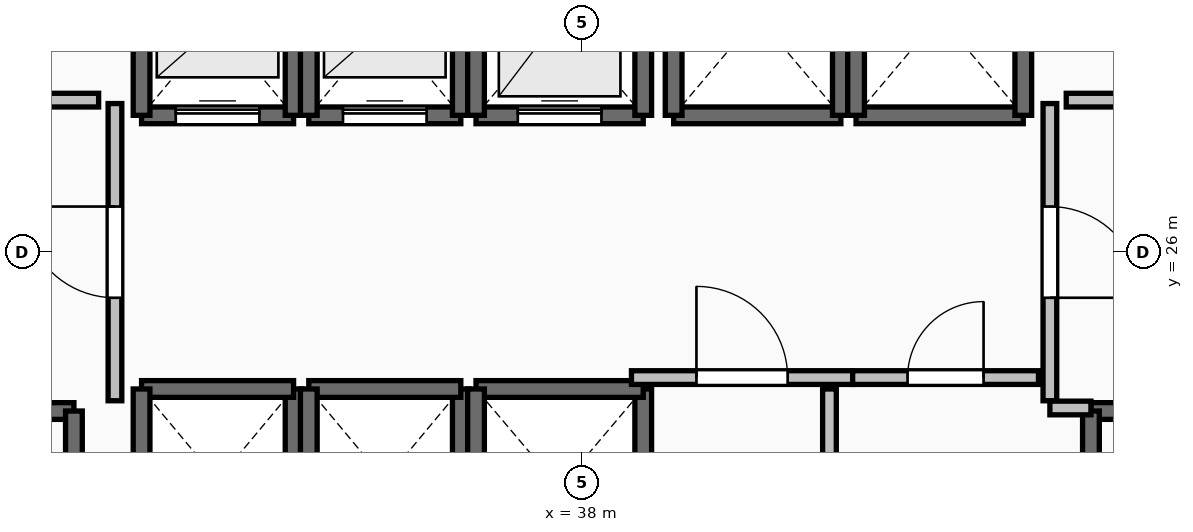
"""IFC4 building model, lengths in metres.
Left out: names, types, materials, properties, quantities, classifications, styles, units other than length and angle.
Written with IfcOpenShell. Run it as: python <this file> out.ifc"""

import sys

from ifc_helpers import new_model, si_unit, direction, frame, frame_2d, origin, place, context, subcontext, project, spatial, rectangle, extrude, element, fill, save


model = new_model("IFC4")
c1 = context("Model", 3, precision=1e-05, world=origin(), true_north=direction((0.0, 1.0)))
c2 = subcontext(c1, "Body", "Model", "MODEL_VIEW")
j1 = project(units=[si_unit("LENGTHUNIT", "METRE"), si_unit("PLANEANGLEUNIT", "RADIAN")], contexts=[c1])
p1 = place(None, origin())
s1 = spatial("IfcSite", under=j1, at=p1, CompositionType="ELEMENT")
p2 = place(p1, origin())
s2 = spatial("IfcBuilding", under=s1, at=p2, CompositionType="ELEMENT")
p3 = place(p2, frame((0.0, 0.0, 103.3)))
s3 = spatial("IfcBuildingStorey", under=s2, at=p3, CompositionType="ELEMENT", Elevation=103.3)
p4 = place(p3, frame((27.94, 23.91, 0.0), z_axis=(0.0, 0.0, 1.0), x_axis=(1.0, 0.0, 0.0)))
e1 = element("IfcWall", 1, at=p4, inside=s3, PredefinedType="SOLIDWALL", context=c2, shape_type="SweptSolid", body=[
    extrude(rectangle(XDim=3.37, YDim=0.22, at=frame_2d((1.685, 0.0))), origin(), (0.0, 0.0, 1.0), 3.24),
])
p5 = place(p4, frame((1.135, 0.0, 0.0)))
e2 = element("IfcOpeningElement", 2, at=p5, cuts=e1, PredefinedType="OPENING", context=c2, shape_type="SweptSolid", body=[
    extrude(rectangle(XDim=1.1, YDim=2.15, at=frame_2d((0.55, 1.075))), frame((0.0, 0.125, 0.0), z_axis=(0.0, -1.0, 0.0), x_axis=(1.0, 0.0, 0.0)), (0.0, 0.0, 1.0), 0.25),
])
p6 = place(p3, frame((31.31, 23.91, 0.0), z_axis=(0.0, 0.0, 1.0), x_axis=(0.0, -1.0, 0.0)))
e3 = element("IfcWall", 3, at=p6, inside=s3, PredefinedType="SOLIDWALL", context=c2, shape_type="SweptSolid", body=[
    extrude(rectangle(XDim=7.42, YDim=0.22, at=frame_2d((3.71, 0.0))), origin(), (0.0, 0.0, 1.0), 3.24),
])
p7 = place(p3, frame((44.69, 23.91, 0.0), z_axis=(0.0, 0.0, 1.0), x_axis=(1.0, 0.0, 0.0)))
e4 = element("IfcWall", 4, at=p7, inside=s3, PredefinedType="SOLIDWALL", context=c2, shape_type="SweptSolid", body=[
    extrude(rectangle(XDim=3.37, YDim=0.22, at=frame_2d((1.685, 0.0))), origin(), (0.0, 0.0, 1.0), 3.24),
])
p8 = place(p7, frame((1.135, 0.0, 0.0)))
e5 = element("IfcOpeningElement", 5, at=p8, cuts=e4, PredefinedType="OPENING", context=c2, shape_type="SweptSolid", body=[
    extrude(rectangle(XDim=1.1, YDim=2.15, at=frame_2d((0.55, 1.075))), frame((0.0, 0.125, 0.0), z_axis=(0.0, -1.0, 0.0), x_axis=(1.0, 0.0, 0.0)), (0.0, 0.0, 1.0), 0.25),
])
p9 = place(p3, frame((44.69, 16.49, 0.0), z_axis=(0.0, 0.0, 1.0), x_axis=(0.0, 1.0, 0.0)))
e6 = element("IfcWall", 6, at=p9, inside=s3, PredefinedType="SOLIDWALL", context=c2, shape_type="SweptSolid", body=[
    extrude(rectangle(XDim=7.42, YDim=0.22, at=frame_2d((3.71, 0.0))), origin(), (0.0, 0.0, 1.0), 3.24),
])
p10 = place(p3, frame((32.2, 27.8, 0.0), z_axis=(0.0, 0.0, 1.0), x_axis=(1.0, 0.0, 0.0)))
e7 = element("IfcWall", 7, at=p10, inside=s3, PredefinedType="SOLIDWALL", context=c2, shape_type="SweptSolid", body=[
    extrude(rectangle(XDim=2.0, YDim=0.22, at=frame_2d((1.0, 0.0))), origin(), (0.0, 0.0, 1.0), 3.24),
])
p11 = place(p10, frame((0.45, 0.0, 0.0)))
e8 = element("IfcOpeningElement", 8, at=p11, cuts=e7, PredefinedType="OPENING", context=c2, shape_type="SweptSolid", body=[
    extrude(rectangle(XDim=1.1, YDim=2.2, at=frame_2d((0.55, 1.1))), frame((0.0, 0.125, 0.0), z_axis=(0.0, -1.0, 0.0), x_axis=(1.0, 0.0, 0.0)), (0.0, 0.0, 1.0), 0.25),
])
for number, where, z_axis, x_axis in (
    (9, (34.2, 27.8, 0.0), (0.0, 0.0, 1.0), (0.0, 1.0, 0.0)),
    (10, (32.2, 30.2, 0.0), (0.0, 0.0, 1.0), (0.0, -1.0, 0.0)),
):
    element("IfcWall", number, at=place(p3, frame(where, z_axis=z_axis, x_axis=x_axis)), inside=s3, PredefinedType="SOLIDWALL", context=c2, shape_type="SweptSolid", body=[
        extrude(rectangle(XDim=2.4, YDim=0.22, at=frame_2d((1.2, 0.0))), origin(), (0.0, 0.0, 1.0), 3.24),
    ])
p12 = place(p3, frame((34.4, 27.8, 0.0), z_axis=(0.0, 0.0, 1.0), x_axis=(1.0, 0.0, 0.0)))
e11 = element("IfcWall", 11, at=p12, inside=s3, PredefinedType="SOLIDWALL", context=c2, shape_type="SweptSolid", body=[
    extrude(rectangle(XDim=2.0, YDim=0.22, at=frame_2d((1.0, 0.0))), origin(), (0.0, 0.0, 1.0), 3.24),
])
p13 = place(p12, frame((0.45, 0.0, 0.0)))
e12 = element("IfcOpeningElement", 12, at=p13, cuts=e11, PredefinedType="OPENING", context=c2, shape_type="SweptSolid", body=[
    extrude(rectangle(XDim=1.1, YDim=2.2, at=frame_2d((0.55, 1.1))), frame((0.0, 0.125, 0.0), z_axis=(0.0, -1.0, 0.0), x_axis=(1.0, 0.0, 0.0)), (0.0, 0.0, 1.0), 0.25),
])
for number, where, z_axis, x_axis in (
    (13, (36.4, 27.8, 0.0), (0.0, 0.0, 1.0), (0.0, 1.0, 0.0)),
    (14, (34.4, 30.2, 0.0), (0.0, 0.0, 1.0), (0.0, -1.0, 0.0)),
):
    element("IfcWall", number, at=place(p3, frame(where, z_axis=z_axis, x_axis=x_axis)), inside=s3, PredefinedType="SOLIDWALL", context=c2, shape_type="SweptSolid", body=[
        extrude(rectangle(XDim=2.4, YDim=0.22, at=frame_2d((1.2, 0.0))), origin(), (0.0, 0.0, 1.0), 3.24),
    ])
p14 = place(p3, frame((36.6, 27.8, 0.0), z_axis=(0.0, 0.0, 1.0), x_axis=(1.0, 0.0, 0.0)))
e15 = element("IfcWall", 15, at=p14, inside=s3, PredefinedType="SOLIDWALL", context=c2, shape_type="SweptSolid", body=[
    extrude(rectangle(XDim=2.2, YDim=0.22, at=frame_2d((1.1, 0.0))), origin(), (0.0, 0.0, 1.0), 3.24),
])
p15 = place(p14, frame((0.55, 0.0, 0.0)))
e16 = element("IfcOpeningElement", 16, at=p15, cuts=e15, PredefinedType="OPENING", context=c2, shape_type="SweptSolid", body=[
    extrude(rectangle(XDim=1.1, YDim=2.2, at=frame_2d((0.55, 1.1))), frame((0.0, 0.125, 0.0), z_axis=(0.0, -1.0, 0.0), x_axis=(1.0, 0.0, 0.0)), (0.0, 0.0, 1.0), 0.25),
])
for number, where, z_axis, x_axis in (
    (17, (38.8, 27.8, 0.0), (0.0, 0.0, 1.0), (0.0, 1.0, 0.0)),
    (18, (36.6, 30.4, 0.0), (0.0, 0.0, 1.0), (0.0, -1.0, 0.0)),
):
    element("IfcWall", number, at=place(p3, frame(where, z_axis=z_axis, x_axis=x_axis)), inside=s3, PredefinedType="SOLIDWALL", context=c2, shape_type="SweptSolid", body=[
        extrude(rectangle(XDim=2.6, YDim=0.22, at=frame_2d((1.3, 0.0))), origin(), (0.0, 0.0, 1.0), 3.24),
    ])
p16 = place(p3, frame((34.2, 21.8, 0.0), z_axis=(0.0, 0.0, 1.0), x_axis=(0.0, 1.0, 0.0)))
e19 = element("IfcWall", 19, at=p16, inside=s3, PredefinedType="SOLIDWALL", context=c2, shape_type="SweptSolid", body=[
    extrude(rectangle(XDim=2.4, YDim=0.22, at=frame_2d((1.2, 0.0))), origin(), (0.0, 0.0, 1.0), 3.24),
])
p17 = place(p3, frame((34.2, 24.2, 0.0), z_axis=(0.0, 0.0, 1.0), x_axis=(-1.0, 0.0, 0.0)))
e20 = element("IfcWall", 20, at=p17, inside=s3, PredefinedType="SOLIDWALL", context=c2, shape_type="SweptSolid", body=[
    extrude(rectangle(XDim=2.0, YDim=0.22, at=frame_2d((1.0, 0.0))), origin(), (0.0, 0.0, 1.0), 3.24),
])
for number, where, z_axis, x_axis in (
    (21, (32.2, 24.2, 0.0), (0.0, 0.0, 1.0), (0.0, -1.0, 0.0)),
    (22, (36.4, 21.8, 0.0), (0.0, 0.0, 1.0), (0.0, 1.0, 0.0)),
):
    element("IfcWall", number, at=place(p3, frame(where, z_axis=z_axis, x_axis=x_axis)), inside=s3, PredefinedType="SOLIDWALL", context=c2, shape_type="SweptSolid", body=[
        extrude(rectangle(XDim=2.4, YDim=0.22, at=frame_2d((1.2, 0.0))), origin(), (0.0, 0.0, 1.0), 3.24),
    ])
p18 = place(p3, frame((36.4, 24.2, 0.0), z_axis=(0.0, 0.0, 1.0), x_axis=(-1.0, 0.0, 0.0)))
e23 = element("IfcWall", 23, at=p18, inside=s3, PredefinedType="SOLIDWALL", context=c2, shape_type="SweptSolid", body=[
    extrude(rectangle(XDim=2.0, YDim=0.22, at=frame_2d((1.0, 0.0))), origin(), (0.0, 0.0, 1.0), 3.24),
])
p19 = place(p3, frame((34.4, 24.2, 0.0), z_axis=(0.0, 0.0, 1.0), x_axis=(0.0, -1.0, 0.0)))
e24 = element("IfcWall", 24, at=p19, inside=s3, PredefinedType="SOLIDWALL", context=c2, shape_type="SweptSolid", body=[
    extrude(rectangle(XDim=2.4, YDim=0.22, at=frame_2d((1.2, 0.0))), origin(), (0.0, 0.0, 1.0), 3.24),
])
p20 = place(p3, frame((38.8, 21.6, 0.0), z_axis=(0.0, 0.0, 1.0), x_axis=(0.0, 1.0, 0.0)))
e25 = element("IfcWall", 25, at=p20, inside=s3, PredefinedType="SOLIDWALL", context=c2, shape_type="SweptSolid", body=[
    extrude(rectangle(XDim=2.6, YDim=0.22, at=frame_2d((1.3, 0.0))), origin(), (0.0, 0.0, 1.0), 3.24),
])
p21 = place(p3, frame((38.8, 24.2, 0.0), z_axis=(0.0, 0.0, 1.0), x_axis=(-1.0, 0.0, 0.0)))
e26 = element("IfcWall", 26, at=p21, inside=s3, PredefinedType="SOLIDWALL", context=c2, shape_type="SweptSolid", body=[
    extrude(rectangle(XDim=2.2, YDim=0.22, at=frame_2d((1.1, 0.0))), origin(), (0.0, 0.0, 1.0), 3.24),
])
p22 = place(p3, frame((36.6, 24.2, 0.0), z_axis=(0.0, 0.0, 1.0), x_axis=(0.0, -1.0, 0.0)))
e27 = element("IfcWall", 27, at=p22, inside=s3, PredefinedType="SOLIDWALL", context=c2, shape_type="SweptSolid", body=[
    extrude(rectangle(XDim=2.6, YDim=0.22, at=frame_2d((1.3, 0.0))), origin(), (0.0, 0.0, 1.0), 3.24),
])
p23 = place(p3, frame((39.2, 27.8, 0.0), z_axis=(0.0, 0.0, 1.0), x_axis=(1.0, 0.0, 0.0)))
e28 = element("IfcWall", 28, at=p23, inside=s3, PredefinedType="SOLIDWALL", context=c2, shape_type="SweptSolid", body=[
    extrude(rectangle(XDim=2.2, YDim=0.22, at=frame_2d((1.1, 0.0))), origin(), (0.0, 0.0, 1.0), 3.24),
])
for number, where, z_axis, x_axis in (
    (29, (41.4, 27.8, 0.0), (0.0, 0.0, 1.0), (0.0, 1.0, 0.0)),
    (30, (39.2, 30.4, 0.0), (0.0, 0.0, 1.0), (0.0, -1.0, 0.0)),
):
    element("IfcWall", number, at=place(p3, frame(where, z_axis=z_axis, x_axis=x_axis)), inside=s3, PredefinedType="SOLIDWALL", context=c2, shape_type="SweptSolid", body=[
        extrude(rectangle(XDim=2.6, YDim=0.22, at=frame_2d((1.3, 0.0))), origin(), (0.0, 0.0, 1.0), 3.24),
    ])
p24 = place(p3, frame((41.6, 27.8, 0.0), z_axis=(0.0, 0.0, 1.0), x_axis=(1.0, 0.0, 0.0)))
e31 = element("IfcWall", 31, at=p24, inside=s3, PredefinedType="SOLIDWALL", context=c2, shape_type="SweptSolid", body=[
    extrude(rectangle(XDim=2.2, YDim=0.22, at=frame_2d((1.1, 0.0))), origin(), (0.0, 0.0, 1.0), 3.24),
])
for number, where, z_axis, x_axis in (
    (32, (43.8, 27.8, 0.0), (0.0, 0.0, 1.0), (0.0, 1.0, 0.0)),
    (33, (41.6, 30.4, 0.0), (0.0, 0.0, 1.0), (0.0, -1.0, 0.0)),
):
    element("IfcWall", number, at=place(p3, frame(where, z_axis=z_axis, x_axis=x_axis)), inside=s3, PredefinedType="SOLIDWALL", context=c2, shape_type="SweptSolid", body=[
        extrude(rectangle(XDim=2.6, YDim=0.22, at=frame_2d((1.3, 0.0))), origin(), (0.0, 0.0, 1.0), 3.24),
    ])
p25 = place(p3, frame((31.85, 24.045, 0.0), z_axis=(0.0, 0.0, 1.0), x_axis=(0.0, 1.0, 0.0)))
e34 = element("IfcWall", 34, at=p25, inside=s3, PredefinedType="PARTITIONING", context=c2, shape_type="SweptSolid", body=[
    extrude(rectangle(XDim=3.91, YDim=0.18, at=frame_2d((1.955, 0.0))), origin(), (0.0, 0.0, 1.0), 3.24),
])
p26 = place(p25, frame((1.355, 0.0, 0.0)))
e35 = element("IfcOpeningElement", 35, at=p26, cuts=e34, PredefinedType="OPENING", context=c2, shape_type="SweptSolid", body=[
    extrude(rectangle(XDim=1.2, YDim=2.15, at=frame_2d((0.6, 1.075))), frame((0.0, 0.105, 0.0), z_axis=(0.0, -1.0, 0.0), x_axis=(1.0, 0.0, 0.0)), (0.0, 0.0, 1.0), 0.21),
])
p27 = place(p3, frame((44.15, 27.955, 0.0), z_axis=(0.0, 0.0, 1.0), x_axis=(0.0, -1.0, 0.0)))
e36 = element("IfcWall", 36, at=p27, inside=s3, PredefinedType="PARTITIONING", context=c2, shape_type="SweptSolid", body=[
    extrude(rectangle(XDim=3.91, YDim=0.18, at=frame_2d((1.955, 0.0))), origin(), (0.0, 0.0, 1.0), 3.24),
])
p28 = place(p27, frame((1.355, 0.0, 0.0)))
e37 = element("IfcOpeningElement", 37, at=p28, cuts=e36, PredefinedType="OPENING", context=c2, shape_type="SweptSolid", body=[
    extrude(rectangle(XDim=1.2, YDim=2.15, at=frame_2d((0.6, 1.075))), frame((0.0, 0.105, 0.0), z_axis=(0.0, -1.0, 0.0), x_axis=(1.0, 0.0, 0.0)), (0.0, 0.0, 1.0), 0.21),
])
p29 = place(p3, frame((44.15, 23.95, 0.0), z_axis=(0.0, 0.0, 1.0), x_axis=(1.0, 0.0, 0.0)))
e38 = element("IfcWall", 38, at=p29, inside=s3, PredefinedType="PARTITIONING", context=c2, shape_type="SweptSolid", body=[
    extrude(rectangle(XDim=0.54, YDim=0.18, at=frame_2d((0.27, 0.0))), origin(), (0.0, 0.0, 1.0), 3.24),
])
p30 = place(p3, frame((38.645, 24.35, 0.0), z_axis=(0.0, 0.0, 1.0), x_axis=(1.0, 0.0, 0.0)))
e39 = element("IfcWall", 39, at=p30, inside=s3, PredefinedType="PARTITIONING", context=c2, shape_type="SweptSolid", body=[
    extrude(rectangle(XDim=2.91, YDim=0.18, at=frame_2d((1.455, 0.0))), origin(), (0.0, 0.0, 1.0), 3.24),
])
p31 = place(p30, frame((0.855, 0.0, 0.0)))
e40 = element("IfcOpeningElement", 40, at=p31, cuts=e39, PredefinedType="OPENING", context=c2, shape_type="SweptSolid", body=[
    extrude(rectangle(XDim=1.2, YDim=2.15, at=frame_2d((0.6, 1.075))), frame((0.0, 0.105, 0.0), z_axis=(0.0, -1.0, 0.0), x_axis=(1.0, 0.0, 0.0)), (0.0, 0.0, 1.0), 0.21),
])
p32 = place(p3, frame((41.555, 24.35, 0.0), z_axis=(0.0, 0.0, 1.0), x_axis=(1.0, 0.0, 0.0)))
e41 = element("IfcWall", 41, at=p32, inside=s3, PredefinedType="PARTITIONING", context=c2, shape_type="SweptSolid", body=[
    extrude(rectangle(XDim=2.445, YDim=0.18, at=frame_2d((1.223, 0.0))), origin(), (0.0, 0.0, 1.0), 3.24),
])
p33 = place(p32, frame((0.722, 0.0, 0.0)))
e42 = element("IfcOpeningElement", 42, at=p33, cuts=e41, PredefinedType="OPENING", context=c2, shape_type="SweptSolid", body=[
    extrude(rectangle(XDim=1.0, YDim=2.15, at=frame_2d((0.5, 1.075))), frame((0.0, 0.105, 0.0), z_axis=(0.0, -1.0, 0.0), x_axis=(1.0, 0.0, 0.0)), (0.0, 0.0, 1.0), 0.21),
])
p34 = place(p3, frame((41.25, 20.305, 0.0), z_axis=(0.0, 0.0, 1.0), x_axis=(0.0, 1.0, 0.0)))
e43 = element("IfcWall", 43, at=p34, inside=s3, PredefinedType="PARTITIONING", context=c2, shape_type="SweptSolid", body=[
    extrude(rectangle(XDim=3.895, YDim=0.18, at=frame_2d((1.948, 0.0))), origin(), (0.0, 0.0, 1.0), 3.24),
])
p35 = place(p34, frame((1.448, 0.0, 0.0)))
e44 = element("IfcOpeningElement", 44, at=p35, cuts=e43, PredefinedType="OPENING", context=c2, shape_type="SweptSolid", body=[
    extrude(rectangle(XDim=1.0, YDim=2.15, at=frame_2d((0.5, 1.075))), frame((0.0, 0.105, 0.0), z_axis=(0.0, -1.0, 0.0), x_axis=(1.0, 0.0, 0.0)), (0.0, 0.0, 1.0), 0.21),
])
for number, where, z_axis, x_axis in (
    (45, (31.635, 28.0, 0.0), (0.0, 0.0, 1.0), (-1.0, 0.0, 0.0)),
    (46, (45.28, 28.0, 0.0), (0.0, 0.0, 1.0), (-1.0, 0.0, 0.0)),
):
    element("IfcWall", number, at=place(p3, frame(where, z_axis=z_axis, x_axis=x_axis)), inside=s3, PredefinedType="PARTITIONING", context=c2, shape_type="SweptSolid", body=[
        extrude(rectangle(XDim=0.915, YDim=0.18, at=frame_2d((0.458, 0.0))), origin(), (0.0, 0.0, 1.0), 3.24),
    ])
p36 = place(p11, origin())
e47 = element("IfcDoor", 47, at=p36, inside=s3, OperationType="SLIDING_TO_LEFT", PredefinedType="DOOR", context=c2, shape_type="SweptSolid", body=[
    extrude(rectangle(XDim=1.1, YDim=2.2, at=frame_2d((0.55, 1.1))), frame((0.0, 0.025, 0.0), z_axis=(0.0, -1.0, 0.0), x_axis=(1.0, 0.0, 0.0)), (0.0, 0.0, 1.0), 0.05),
])
fill(e8, e47)
p37 = place(p13, origin())
e48 = element("IfcDoor", 48, at=p37, inside=s3, OperationType="SLIDING_TO_LEFT", PredefinedType="DOOR", context=c2, shape_type="SweptSolid", body=[
    extrude(rectangle(XDim=1.1, YDim=2.2, at=frame_2d((0.55, 1.1))), frame((0.0, 0.025, 0.0), z_axis=(0.0, -1.0, 0.0), x_axis=(1.0, 0.0, 0.0)), (0.0, 0.0, 1.0), 0.05),
])
fill(e12, e48)
p38 = place(p15, origin())
e49 = element("IfcDoor", 49, at=p38, inside=s3, OperationType="SLIDING_TO_LEFT", PredefinedType="DOOR", context=c2, shape_type="SweptSolid", body=[
    extrude(rectangle(XDim=1.1, YDim=2.2, at=frame_2d((0.55, 1.1))), frame((0.0, 0.025, 0.0), z_axis=(0.0, -1.0, 0.0), x_axis=(1.0, 0.0, 0.0)), (0.0, 0.0, 1.0), 0.05),
])
fill(e16, e49)
p39 = place(p26, origin())
e50 = element("IfcDoor", 50, at=p39, inside=s3, OperationType="SINGLE_SWING_RIGHT", PredefinedType="DOOR", context=c2, shape_type="SweptSolid", body=[
    extrude(rectangle(XDim=1.2, YDim=2.15, at=frame_2d((0.6, 1.075))), frame((0.0, 0.025, 0.0), z_axis=(0.0, -1.0, 0.0), x_axis=(1.0, 0.0, 0.0)), (0.0, 0.0, 1.0), 0.05),
])
fill(e35, e50)
p40 = place(p28, origin())
e51 = element("IfcDoor", 51, at=p40, inside=s3, OperationType="SINGLE_SWING_RIGHT", PredefinedType="DOOR", context=c2, shape_type="SweptSolid", body=[
    extrude(rectangle(XDim=1.2, YDim=2.15, at=frame_2d((0.6, 1.075))), frame((0.0, 0.025, 0.0), z_axis=(0.0, -1.0, 0.0), x_axis=(1.0, 0.0, 0.0)), (0.0, 0.0, 1.0), 0.05),
])
fill(e37, e51)
p41 = place(p31, origin())
e52 = element("IfcDoor", 52, at=p41, inside=s3, OperationType="SINGLE_SWING_LEFT", PredefinedType="DOOR", context=c2, shape_type="SweptSolid", body=[
    extrude(rectangle(XDim=1.2, YDim=2.15, at=frame_2d((0.6, 1.075))), frame((0.0, 0.025, 0.0), z_axis=(0.0, -1.0, 0.0), x_axis=(1.0, 0.0, 0.0)), (0.0, 0.0, 1.0), 0.05),
])
fill(e40, e52)
p42 = place(p33, origin())
e53 = element("IfcDoor", 53, at=p42, inside=s3, OperationType="SINGLE_SWING_RIGHT", PredefinedType="DOOR", context=c2, shape_type="SweptSolid", body=[
    extrude(rectangle(XDim=1.0, YDim=2.15, at=frame_2d((0.5, 1.075))), frame((0.0, 0.025, 0.0), z_axis=(0.0, -1.0, 0.0), x_axis=(1.0, 0.0, 0.0)), (0.0, 0.0, 1.0), 0.05),
])
fill(e42, e53)
save(model, sys.argv[1])
